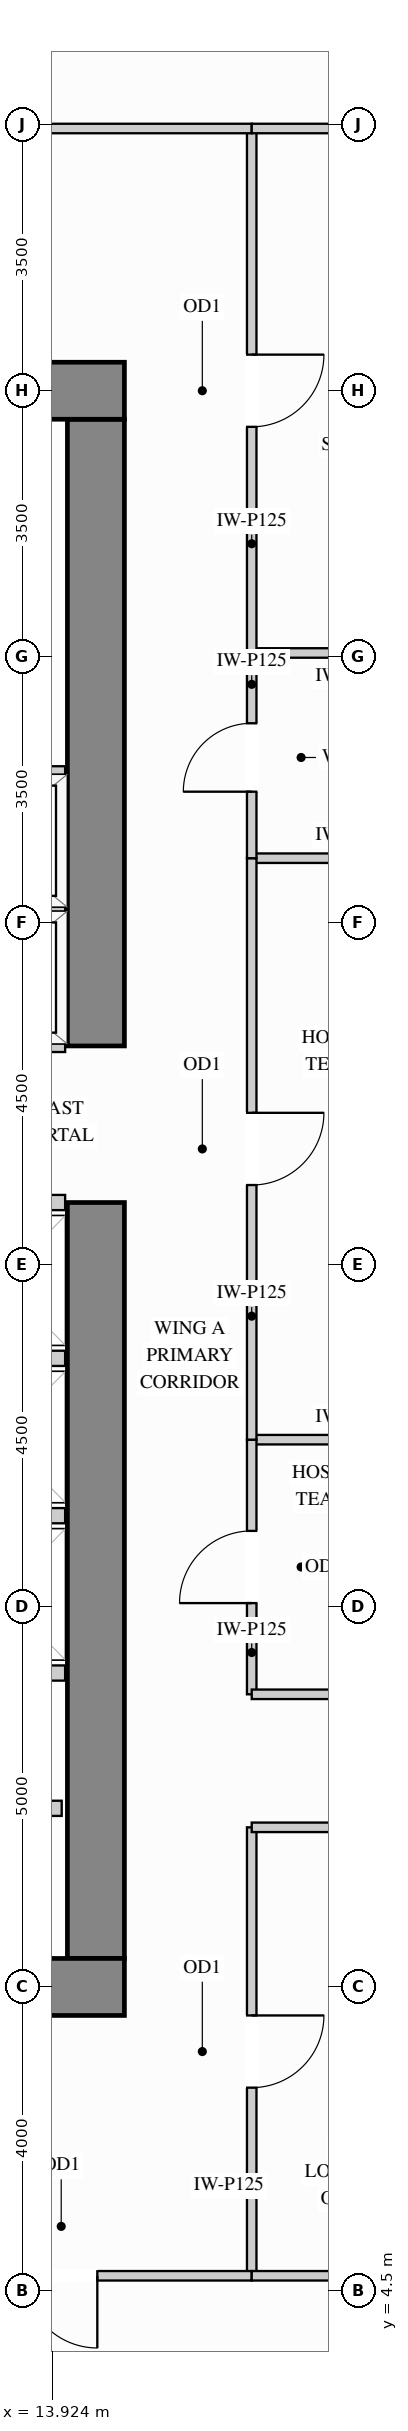
"""IFC4 building model, lengths in metres.
Left out: names, types, materials, properties, quantities, classifications, styles, units other than length and angle.
Written with IfcOpenShell. Run it as: python <this file> out.ifc"""

import sys

from ifc_helpers import new_model, si_unit, direction, frame, frame_2d, origin, place, context, subcontext, project, spatial, rectangle, extrude, source, transform, mapped, element, fill, save


model = new_model("IFC4")
c1 = context("Model", 3, precision=1e-05, world=origin(), true_north=direction((0.0, 1.0)))
c2 = subcontext(c1, "Body", "Model", "MODEL_VIEW")
j1 = project(units=[si_unit("LENGTHUNIT", "METRE"), si_unit("PLANEANGLEUNIT", "RADIAN")], contexts=[c1])
p1 = place(None, origin())
s1 = spatial("IfcSite", under=j1, at=p1, CompositionType="ELEMENT")
p2 = place(p1, origin())
s2 = spatial("IfcBuilding", under=s1, at=p2, CompositionType="ELEMENT")
p3 = place(p2, frame((0.0, 0.0, 99.0)))
s3 = spatial("IfcBuildingStorey", under=s2, at=p3, CompositionType="ELEMENT", Elevation=99.0)
m1 = source(origin(), c2, "Body", "SweptSolid", [
    extrude(rectangle(XDim=9.945, YDim=0.75, at=frame_2d((4.973, 0.0))), origin(), (0.0, 0.0, 1.0), 3.38),
])
p4 = place(p3, frame((14.5, 8.875, 0.0), z_axis=(0.0, 0.0, 1.0), x_axis=(0.0, 1.0, 0.0)))
e1 = element("IfcWall", 1, at=p4, inside=s3, PredefinedType="SHEAR", context=c2, shape_type="MappedRepresentation", body=[
    mapped(m1, transform((0.0, 0.0, 0.0), x_axis=(1.0, 0.0, 0.0), y_axis=(0.0, 1.0, 0.0), z_axis=(0.0, 0.0, 1.0))),
])
m2 = source(origin(), c2, "Body", "SweptSolid", [
    extrude(rectangle(XDim=8.245, YDim=0.75, at=frame_2d((4.123, 0.0))), origin(), (0.0, 0.0, 1.0), 3.38),
])
p5 = place(p3, frame((14.5, 20.88, 0.0), z_axis=(0.0, 0.0, 1.0), x_axis=(0.0, 1.0, 0.0)))
e2 = element("IfcWall", 2, at=p5, inside=s3, PredefinedType="SHEAR", context=c2, shape_type="MappedRepresentation", body=[
    mapped(m2, transform((0.0, 0.0, 0.0), x_axis=(1.0, 0.0, 0.0), y_axis=(0.0, 1.0, 0.0), z_axis=(0.0, 0.0, 1.0))),
])
m3 = source(origin(), c2, "Body", "SweptSolid", [
    extrude(rectangle(XDim=10.75, YDim=0.75, at=frame_2d((5.375, 0.0))), origin(), (0.0, 0.0, 1.0), 3.38),
])
for number, where, z_axis, x_axis in (
    (3, (4.125, 29.5, 0.0), (0.0, 0.0, 1.0), (1.0, 0.0, 0.0)),
    (4, (4.125, 8.5, 0.0), (0.0, 0.0, 1.0), (1.0, 0.0, 0.0)),
):
    element("IfcWall", number, at=place(p3, frame(where, z_axis=z_axis, x_axis=x_axis)), inside=s3, PredefinedType="SHEAR", context=c2, shape_type="MappedRepresentation", body=[
        mapped(m3, transform((0.0, 0.0, 0.0), x_axis=(1.0, 0.0, 0.0), y_axis=(0.0, 1.0, 0.0), z_axis=(0.0, 0.0, 1.0))),
    ])
m4 = source(origin(), c2, "Body", "SweptSolid", [
    extrude(rectangle(XDim=2.6, YDim=0.125, at=frame_2d((1.3, 0.0))), origin(), (0.0, 0.0, 1.0), 3.365),
])
p6 = place(p3, frame((16.55, 15.7, 0.0), z_axis=(0.0, 0.0, 1.0), x_axis=(1.0, 0.0, 0.0)))
e5 = element("IfcWall", 5, at=p6, inside=s3, PredefinedType="PARTITIONING", context=c2, shape_type="MappedRepresentation", body=[
    mapped(m4, transform((0.0, 0.0, 0.0), x_axis=(1.0, 0.0, 0.0), y_axis=(0.0, 1.0, 0.0), z_axis=(0.0, 0.0, 1.0))),
])
m5 = source(origin(), c2, "Body", "SweptSolid", [
    extrude(rectangle(XDim=2.598, YDim=0.125, at=frame_2d((1.299, 0.0))), origin(), (0.0, 0.0, 1.0), 3.365),
])
for number, where, z_axis, x_axis in (
    (6, (16.55, 23.35, 0.0), (0.0, 0.0, 1.0), (1.0, 0.0, 0.0)),
    (7, (16.55, 26.05, 0.0), (0.0, 0.0, 1.0), (1.0, 0.0, 0.0)),
):
    element("IfcWall", number, at=place(p3, frame(where, z_axis=z_axis, x_axis=x_axis)), inside=s3, PredefinedType="PARTITIONING", context=c2, shape_type="MappedRepresentation", body=[
        mapped(m5, transform((0.0, 0.0, 0.0), x_axis=(1.0, 0.0, 0.0), y_axis=(0.0, 1.0, 0.0), z_axis=(0.0, 0.0, 1.0))),
    ])
p7 = place(p3, frame((16.55, 12.35, 0.0), z_axis=(0.0, 0.0, 1.0), x_axis=(0.0, 1.0, 0.0)))
e8 = element("IfcWall", 8, at=p7, inside=s3, PredefinedType="PARTITIONING", context=c2, shape_type="SweptSolid", body=[
    extrude(rectangle(XDim=3.35, YDim=0.125, at=frame_2d((1.675, 0.0))), origin(), (0.0, 0.0, 1.0), 3.365),
])
p8 = place(p7, frame((1.2, 0.0, 0.0)))
e9 = element("IfcOpeningElement", 9, at=p8, cuts=e8, PredefinedType="OPENING", context=c2, shape_type="SweptSolid", body=[
    extrude(rectangle(XDim=0.95, YDim=2.15, at=frame_2d((0.475, 1.075))), frame((0.0, 0.073, 0.0), z_axis=(0.0, -1.0, 0.0), x_axis=(1.0, 0.0, 0.0)), (0.0, 0.0, 1.0), 0.145),
])
p9 = place(p3, frame((16.55, 15.7, 0.0), z_axis=(0.0, 0.0, 1.0), x_axis=(0.0, 1.0, 0.0)))
e10 = element("IfcWall", 10, at=p9, inside=s3, PredefinedType="PARTITIONING", context=c2, shape_type="SweptSolid", body=[
    extrude(rectangle(XDim=7.65, YDim=0.125, at=frame_2d((3.825, 0.0))), origin(), (0.0, 0.0, 1.0), 3.365),
])
p10 = place(p9, frame((3.35, 0.0, 0.0)))
e11 = element("IfcOpeningElement", 11, at=p10, cuts=e10, PredefinedType="OPENING", context=c2, shape_type="SweptSolid", body=[
    extrude(rectangle(XDim=0.95, YDim=2.15, at=frame_2d((0.475, 1.075))), frame((0.0, 0.073, 0.0), z_axis=(0.0, -1.0, 0.0), x_axis=(1.0, 0.0, 0.0)), (0.0, 0.0, 1.0), 0.145),
])
p11 = place(p3, frame((16.55, 26.05, 0.0), z_axis=(0.0, 0.0, 1.0), x_axis=(0.0, 1.0, 0.0)))
e12 = element("IfcWall", 12, at=p11, inside=s3, PredefinedType="PARTITIONING", context=c2, shape_type="SweptSolid", body=[
    extrude(rectangle(XDim=6.9, YDim=0.125, at=frame_2d((3.45, 0.0))), origin(), (0.0, 0.0, 1.0), 3.365),
])
p12 = place(p11, frame((2.975, 0.0, 0.0)))
e13 = element("IfcOpeningElement", 13, at=p12, cuts=e12, PredefinedType="OPENING", context=c2, shape_type="SweptSolid", body=[
    extrude(rectangle(XDim=0.95, YDim=2.15, at=frame_2d((0.475, 1.075))), frame((0.0, 0.073, 0.0), z_axis=(0.0, -1.0, 0.0), x_axis=(1.0, 0.0, 0.0)), (0.0, 0.0, 1.0), 0.145),
])
p13 = place(p3, frame((16.55, 4.7, 0.0), z_axis=(0.0, 0.0, 1.0), x_axis=(0.0, 1.0, 0.0)))
e14 = element("IfcWall", 14, at=p13, inside=s3, PredefinedType="PARTITIONING", context=c2, shape_type="SweptSolid", body=[
    extrude(rectangle(XDim=5.9, YDim=0.125, at=frame_2d((2.95, 0.0))), origin(), (0.0, 0.0, 1.0), 3.365),
])
p14 = place(p13, frame((2.475, 0.0, 0.0)))
e15 = element("IfcOpeningElement", 15, at=p14, cuts=e14, PredefinedType="OPENING", context=c2, shape_type="SweptSolid", body=[
    extrude(rectangle(XDim=0.95, YDim=2.15, at=frame_2d((0.475, 1.075))), frame((0.0, 0.073, 0.0), z_axis=(0.0, -1.0, 0.0), x_axis=(1.0, 0.0, 0.0)), (0.0, 0.0, 1.0), 0.145),
])
p15 = place(p3, frame((16.55, 23.35, 0.0), z_axis=(0.0, 0.0, 1.0), x_axis=(0.0, 1.0, 0.0)))
e16 = element("IfcWall", 16, at=p15, inside=s3, PredefinedType="PARTITIONING", context=c2, shape_type="SweptSolid", body=[
    extrude(rectangle(XDim=2.7, YDim=0.125, at=frame_2d((1.35, 0.0))), origin(), (0.0, 0.0, 1.0), 3.365),
])
p16 = place(p15, frame((0.875, 0.0, 0.0)))
e17 = element("IfcOpeningElement", 17, at=p16, cuts=e16, PredefinedType="OPENING", context=c2, shape_type="SweptSolid", body=[
    extrude(rectangle(XDim=0.9, YDim=2.15, at=frame_2d((0.45, 1.075))), frame((0.0, 0.073, 0.0), z_axis=(0.0, -1.0, 0.0), x_axis=(1.0, 0.0, 0.0)), (0.0, 0.0, 1.0), 0.145),
])
p17 = place(p3, frame((2.45, 32.95, 0.0), z_axis=(0.0, 0.0, 1.0), x_axis=(1.0, 0.0, 0.0)))
e18 = element("IfcWall", 18, at=p17, inside=s3, PredefinedType="PARTITIONING", context=c2, shape_type="SweptSolid", body=[
    extrude(rectangle(XDim=14.1, YDim=0.125, at=frame_2d((7.05, 0.0))), origin(), (0.0, 0.0, 1.0), 3.365),
])
p18 = place(p17, frame((6.575, 0.0, 0.0)))
e19 = element("IfcOpeningElement", 19, at=p18, cuts=e18, PredefinedType="OPENING", context=c2, shape_type="SweptSolid", body=[
    extrude(rectangle(XDim=0.95, YDim=2.15, at=frame_2d((0.475, 1.075))), frame((0.0, 0.073, 0.0), z_axis=(0.0, -1.0, 0.0), x_axis=(1.0, 0.0, 0.0)), (0.0, 0.0, 1.0), 0.145),
])
p19 = place(p3, frame((16.55, 32.95, 0.0), z_axis=(0.0, 0.0, 1.0), x_axis=(1.0, 0.0, 0.0)))
e20 = element("IfcWall", 20, at=p19, inside=s3, PredefinedType="PARTITIONING", context=c2, shape_type="MappedRepresentation", body=[
    mapped(m5, transform((0.0, 0.0, 0.0), x_axis=(1.0, 0.0, 0.0), y_axis=(0.0, 1.0, 0.0), z_axis=(0.0, 0.0, 1.0))),
])
m6 = source(origin(), c2, "Body", "SweptSolid", [
    extrude(rectangle(XDim=2.95, YDim=0.125, at=frame_2d((1.475, 0.0))), origin(), (0.0, 0.0, 1.0), 3.365),
])
for number, where, z_axis, x_axis in (
    (21, (16.55, 12.35, 0.0), (0.0, 0.0, 1.0), (1.0, 0.0, 0.0)),
    (22, (16.55, 10.6, 0.0), (0.0, 0.0, 1.0), (1.0, 0.0, 0.0)),
):
    element("IfcWall", number, at=place(p3, frame(where, z_axis=z_axis, x_axis=x_axis)), inside=s3, PredefinedType="PARTITIONING", context=c2, shape_type="MappedRepresentation", body=[
        mapped(m6, transform((0.0, 0.0, 0.0), x_axis=(1.0, 0.0, 0.0), y_axis=(0.0, 1.0, 0.0), z_axis=(0.0, 0.0, 1.0))),
    ])
p20 = place(p3, frame((11.537, 4.7, 0.0), z_axis=(0.0, 0.0, 1.0), x_axis=(1.0, 0.0, 0.0)))
e23 = element("IfcWall", 23, at=p20, inside=s3, PredefinedType="PARTITIONING", context=c2, shape_type="SweptSolid", body=[
    extrude(rectangle(XDim=5.013, YDim=0.125, at=frame_2d((2.506, 0.0))), origin(), (0.0, 0.0, 1.0), 2.828),
])
p21 = place(p20, frame((2.031, 0.0, 0.0)))
e24 = element("IfcOpeningElement", 24, at=p21, cuts=e23, PredefinedType="OPENING", context=c2, shape_type="SweptSolid", body=[
    extrude(rectangle(XDim=0.95, YDim=2.15, at=frame_2d((0.475, 1.075))), frame((0.0, 0.073, 0.0), z_axis=(0.0, -1.0, 0.0), x_axis=(1.0, 0.0, 0.0)), (0.0, 0.0, 1.0), 0.145),
])
m7 = source(origin(), c2, "Body", "SweptSolid", [
    extrude(rectangle(XDim=2.598, YDim=0.125, at=frame_2d((1.299, 0.0))), origin(), (0.0, 0.0, 1.0), 2.828),
])
p22 = place(p3, frame((16.55, 4.7, 0.0), z_axis=(0.0, 0.0, 1.0), x_axis=(1.0, 0.0, 0.0)))
e25 = element("IfcWall", 25, at=p22, inside=s3, PredefinedType="PARTITIONING", context=c2, shape_type="MappedRepresentation", body=[
    mapped(m7, transform((0.0, 0.0, 0.0), x_axis=(1.0, 0.0, 0.0), y_axis=(0.0, 1.0, 0.0), z_axis=(0.0, 0.0, 1.0))),
])
m8 = source(origin(), c2, "Body", "SweptSolid", [
    extrude(rectangle(XDim=1.63, YDim=0.2, at=frame_2d((0.815, 0.0))), origin(), (0.0, 0.0, 1.0), 3.365),
])
p23 = place(p3, frame((12.42, 10.85, 0.0), z_axis=(0.0, 0.0, 1.0), x_axis=(1.0, 0.0, 0.0)))
e26 = element("IfcWall", 26, at=p23, inside=s3, PredefinedType="PARTITIONING", context=c2, shape_type="MappedRepresentation", body=[
    mapped(m8, transform((0.0, 0.0, 0.0), x_axis=(1.0, 0.0, 0.0), y_axis=(0.0, 1.0, 0.0), z_axis=(0.0, 0.0, 1.0))),
])
m9 = source(origin(), c2, "Body", "SweptSolid", [
    extrude(rectangle(XDim=2.265, YDim=0.2, at=frame_2d((1.132, 0.0))), origin(), (0.0, 0.0, 1.0), 3.365),
])
for number, where, z_axis, x_axis in (
    (27, (11.83, 22.66, 0.0), (0.0, 0.0, 1.0), (1.0, 0.0, 0.0)),
    (28, (11.83, 20.9, 0.0), (0.0, 0.0, 1.0), (1.0, 0.0, 0.0)),
    (29, (11.83, 24.46, 0.0), (0.0, 0.0, 1.0), (1.0, 0.0, 0.0)),
):
    element("IfcWall", number, at=place(p3, frame(where, z_axis=z_axis, x_axis=x_axis)), inside=s3, PredefinedType="PARTITIONING", context=c2, shape_type="MappedRepresentation", body=[
        mapped(m9, transform((0.0, 0.0, 0.0), x_axis=(1.0, 0.0, 0.0), y_axis=(0.0, 1.0, 0.0), z_axis=(0.0, 0.0, 1.0))),
    ])
m10 = source(origin(), c2, "Body", "SweptSolid", [
    extrude(rectangle(XDim=1.865, YDim=0.2, at=frame_2d((0.933, 0.0))), origin(), (0.0, 0.0, 1.0), 3.365),
])
for number, where, z_axis, x_axis in (
    (30, (12.23, 14.7, 0.0), (0.0, 0.0, 1.0), (1.0, 0.0, 0.0)),
    (31, (12.23, 12.63, 0.0), (0.0, 0.0, 1.0), (1.0, 0.0, 0.0)),
    (32, (12.23, 16.77, 0.0), (0.0, 0.0, 1.0), (1.0, 0.0, 0.0)),
    (33, (12.23, 18.82, 0.0), (0.0, 0.0, 1.0), (1.0, 0.0, 0.0)),
):
    element("IfcWall", number, at=place(p3, frame(where, z_axis=z_axis, x_axis=x_axis)), inside=s3, PredefinedType="PARTITIONING", context=c2, shape_type="MappedRepresentation", body=[
        mapped(m10, transform((0.0, 0.0, 0.0), x_axis=(1.0, 0.0, 0.0), y_axis=(0.0, 1.0, 0.0), z_axis=(0.0, 0.0, 1.0))),
    ])
m11 = source(origin(), c2, "Body", "SweptSolid", [
    extrude(rectangle(XDim=0.95, YDim=2.15, at=frame_2d((0.475, 1.075))), frame((0.0, 0.025, 0.0), z_axis=(0.0, -1.0, 0.0), x_axis=(1.0, 0.0, 0.0)), (0.0, 0.0, 1.0), 0.05),
])
p24 = place(p14, origin())
e34 = element("IfcDoor", 34, at=p24, inside=s3, OperationType="SINGLE_SWING_RIGHT", PredefinedType="DOOR", context=c2, shape_type="MappedRepresentation", body=[
    mapped(m11, transform((0.0, 0.0, 0.0), x_axis=(1.0, 0.0, 0.0), y_axis=(0.0, 1.0, 0.0), z_axis=(0.0, 0.0, 1.0))),
])
fill(e15, e34)
p25 = place(p8, origin())
e35 = element("IfcDoor", 35, at=p25, inside=s3, OperationType="SINGLE_SWING_LEFT", PredefinedType="DOOR", context=c2, shape_type="MappedRepresentation", body=[
    mapped(m11, transform((0.0, 0.0, 0.0), x_axis=(1.0, 0.0, 0.0), y_axis=(0.0, 1.0, 0.0), z_axis=(0.0, 0.0, 1.0))),
])
fill(e9, e35)
p26 = place(p10, origin())
e36 = element("IfcDoor", 36, at=p26, inside=s3, OperationType="SINGLE_SWING_RIGHT", PredefinedType="DOOR", context=c2, shape_type="MappedRepresentation", body=[
    mapped(m11, transform((0.0, 0.0, 0.0), x_axis=(1.0, 0.0, 0.0), y_axis=(0.0, 1.0, 0.0), z_axis=(0.0, 0.0, 1.0))),
])
fill(e11, e36)
p27 = place(p12, origin())
e37 = element("IfcDoor", 37, at=p27, inside=s3, OperationType="SINGLE_SWING_RIGHT", PredefinedType="DOOR", context=c2, shape_type="MappedRepresentation", body=[
    mapped(m11, transform((0.0, 0.0, 0.0), x_axis=(1.0, 0.0, 0.0), y_axis=(0.0, 1.0, 0.0), z_axis=(0.0, 0.0, 1.0))),
])
fill(e13, e37)
p28 = place(p21, origin())
e38 = element("IfcDoor", 38, at=p28, inside=s3, OperationType="SINGLE_SWING_RIGHT", PredefinedType="DOOR", context=c2, shape_type="MappedRepresentation", body=[
    mapped(m11, transform((0.0, 0.0, 0.0), x_axis=(1.0, 0.0, 0.0), y_axis=(0.0, 1.0, 0.0), z_axis=(0.0, 0.0, 1.0))),
])
fill(e24, e38)
m12 = source(origin(), c2, "Body", "SweptSolid", [
    extrude(rectangle(XDim=0.9, YDim=2.15, at=frame_2d((0.45, 1.075))), frame((0.0, 0.025, 0.0), z_axis=(0.0, -1.0, 0.0), x_axis=(1.0, 0.0, 0.0)), (0.0, 0.0, 1.0), 0.05),
])
p29 = place(p16, origin())
e39 = element("IfcDoor", 39, at=p29, inside=s3, OperationType="SINGLE_SWING_LEFT", PredefinedType="DOOR", context=c2, shape_type="MappedRepresentation", body=[
    mapped(m12, transform((0.0, 0.0, 0.0), x_axis=(1.0, 0.0, 0.0), y_axis=(0.0, 1.0, 0.0), z_axis=(0.0, 0.0, 1.0))),
])
fill(e17, e39)
save(model, sys.argv[1])
